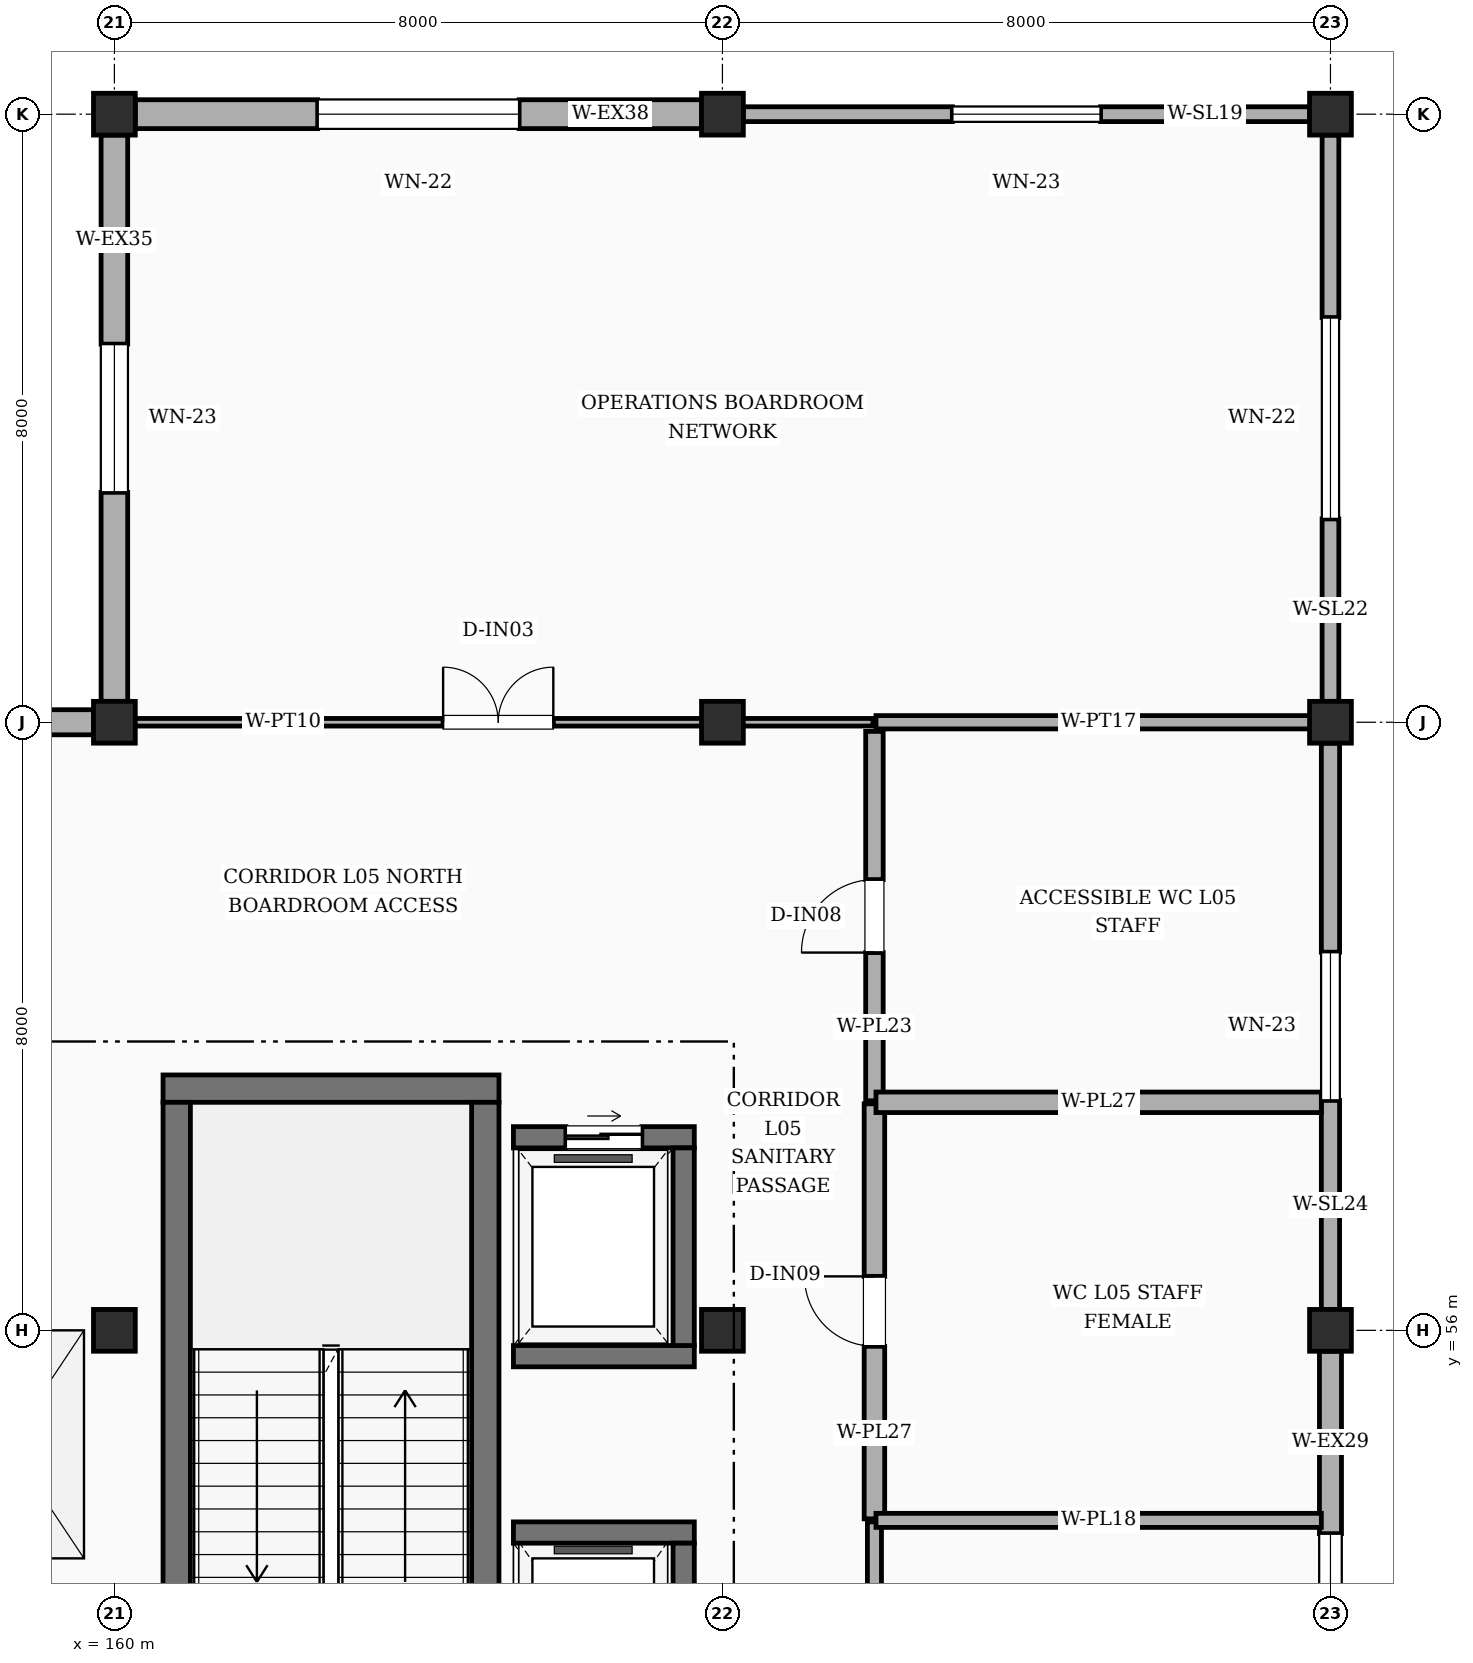
"""IFC4 building model, lengths in metres.
Left out: names, types, materials, properties, quantities, classifications, styles, units other than length and angle.
Written with IfcOpenShell. Run it as: python <this file> out.ifc"""

import sys

from ifc_helpers import new_model, si_unit, direction, frame, frame_2d, origin, origin_2d, place, context, subcontext, project, spatial, rectangle, extrude, element, fill, save


model = new_model("IFC4")
c1 = context("Model", 3, precision=1e-05, world=origin(), true_north=direction((0.0, 1.0)))
c2 = subcontext(c1, "Body", "Model", "MODEL_VIEW")
j1 = project(units=[si_unit("LENGTHUNIT", "METRE"), si_unit("PLANEANGLEUNIT", "RADIAN")], contexts=[c1])
p1 = place(None, origin())
s1 = spatial("IfcSite", under=j1, at=p1, CompositionType="ELEMENT")
p2 = place(p1, origin())
s2 = spatial("IfcBuilding", under=s1, at=p2, CompositionType="ELEMENT")
p3 = place(p2, frame((0.0, 0.0, 23.4)))
s3 = spatial("IfcBuildingStorey", under=s2, at=p3, CompositionType="ELEMENT", Elevation=23.4)
for number, where, z_axis, x_axis in (
    (1, (160.0, 56.0, 0.0), (0.0, 0.0, 1.0), (1.0, 0.0, 0.0)),
    (2, (160.0, 64.0, 0.0), (0.0, 0.0, 1.0), (1.0, 0.0, 0.0)),
    (3, (168.0, 56.0, 0.0), (0.0, 0.0, 1.0), (1.0, 0.0, 0.0)),
    (4, (168.0, 64.0, 0.0), (0.0, 0.0, 1.0), (1.0, 0.0, 0.0)),
    (5, (176.0, 56.0, 0.0), (0.0, 0.0, 1.0), (1.0, 0.0, 0.0)),
    (6, (176.0, 64.0, 0.0), (0.0, 0.0, 1.0), (1.0, 0.0, 0.0)),
    (7, (160.0, 72.0, 0.0), (0.0, 0.0, 1.0), (1.0, 0.0, 0.0)),
    (8, (168.0, 72.0, 0.0), (0.0, 0.0, 1.0), (1.0, 0.0, 0.0)),
    (9, (176.0, 72.0, 0.0), (0.0, 0.0, 1.0), (1.0, 0.0, 0.0)),
):
    element("IfcColumn", number, at=place(p3, frame(where, z_axis=z_axis, x_axis=x_axis)), inside=s3, PredefinedType="COLUMN", context=c2, shape_type="SweptSolid", body=[
        extrude(rectangle(XDim=0.55, YDim=0.55, at=origin_2d()), origin(), (0.0, 0.0, 1.0), 4.2),
    ])
p4 = place(p3, frame((176.0, 48.275, 0.0), z_axis=(0.0, 0.0, 1.0), x_axis=(0.0, 1.0, 0.0)))
e10 = element("IfcWall", 10, at=p4, inside=s3, PredefinedType="STANDARD", context=c2, shape_type="SweptSolid", body=[
    extrude(rectangle(XDim=7.45, YDim=0.29, at=frame_2d((3.725, 0.0))), origin(), (0.0, 0.0, 1.0), 3.58),
])
p5 = place(p4, frame((2.4, 0.0, 0.95)))
e11 = element("IfcOpeningElement", 11, at=p5, cuts=e10, PredefinedType="OPENING", context=c2, shape_type="SweptSolid", body=[
    extrude(rectangle(XDim=2.65, YDim=1.95, at=frame_2d((1.325, 0.975))), frame((0.0, 0.155, 0.0), z_axis=(0.0, -1.0, 0.0), x_axis=(1.0, 0.0, 0.0)), (0.0, 0.0, 1.0), 0.31),
])
p6 = place(p3, frame((176.0, 56.275, 0.0), z_axis=(0.0, 0.0, 1.0), x_axis=(0.0, 1.0, 0.0)))
e12 = element("IfcWall", 12, at=p6, inside=s3, PredefinedType="SOLIDWALL", context=c2, shape_type="SweptSolid", body=[
    extrude(rectangle(XDim=7.45, YDim=0.24, at=frame_2d((3.725, 0.0))), origin(), (0.0, 0.0, 1.0), 3.58),
])
p7 = place(p6, frame((2.75, 0.0, 0.95)))
e13 = element("IfcOpeningElement", 13, at=p7, cuts=e12, PredefinedType="OPENING", context=c2, shape_type="SweptSolid", body=[
    extrude(rectangle(XDim=1.95, YDim=1.95, at=frame_2d((0.975, 0.975))), frame((0.0, 0.13, 0.0), z_axis=(0.0, -1.0, 0.0), x_axis=(1.0, 0.0, 0.0)), (0.0, 0.0, 1.0), 0.26),
])
p8 = place(p3, frame((176.0, 64.275, 0.0), z_axis=(0.0, 0.0, 1.0), x_axis=(0.0, 1.0, 0.0)))
e14 = element("IfcWall", 14, at=p8, inside=s3, PredefinedType="SOLIDWALL", context=c2, shape_type="SweptSolid", body=[
    extrude(rectangle(XDim=7.45, YDim=0.22, at=frame_2d((3.725, 0.0))), origin(), (0.0, 0.0, 1.0), 3.442),
])
p9 = place(p8, frame((2.4, 0.0, 0.95)))
e15 = element("IfcOpeningElement", 15, at=p9, cuts=e14, PredefinedType="OPENING", context=c2, shape_type="SweptSolid", body=[
    extrude(rectangle(XDim=2.65, YDim=1.95, at=frame_2d((1.325, 0.975))), frame((0.0, 0.12, 0.0), z_axis=(0.0, -1.0, 0.0), x_axis=(1.0, 0.0, 0.0)), (0.0, 0.0, 1.0), 0.24),
])
p10 = place(p3, frame((175.725, 72.0, 0.0), z_axis=(0.0, 0.0, 1.0), x_axis=(-1.0, 0.0, 0.0)))
e16 = element("IfcWall", 16, at=p10, inside=s3, PredefinedType="SOLIDWALL", context=c2, shape_type="SweptSolid", body=[
    extrude(rectangle(XDim=7.45, YDim=0.195, at=frame_2d((3.725, 0.0))), origin(), (0.0, 0.0, 1.0), 3.58),
])
p11 = place(p10, frame((2.75, 0.0, 0.95)))
e17 = element("IfcOpeningElement", 17, at=p11, cuts=e16, PredefinedType="OPENING", context=c2, shape_type="SweptSolid", body=[
    extrude(rectangle(XDim=1.95, YDim=1.95, at=frame_2d((0.975, 0.975))), frame((0.0, 0.107, 0.0), z_axis=(0.0, -1.0, 0.0), x_axis=(1.0, 0.0, 0.0)), (0.0, 0.0, 1.0), 0.215),
])
p12 = place(p3, frame((167.725, 72.0, 0.0), z_axis=(0.0, 0.0, 1.0), x_axis=(-1.0, 0.0, 0.0)))
e18 = element("IfcWall", 18, at=p12, inside=s3, PredefinedType="STANDARD", context=c2, shape_type="SweptSolid", body=[
    extrude(rectangle(XDim=7.45, YDim=0.38, at=frame_2d((3.725, 0.0))), origin(), (0.0, 0.0, 1.0), 3.58),
])
p13 = place(p12, frame((2.4, 0.0, 0.95)))
e19 = element("IfcOpeningElement", 19, at=p13, cuts=e18, PredefinedType="OPENING", context=c2, shape_type="SweptSolid", body=[
    extrude(rectangle(XDim=2.65, YDim=1.95, at=frame_2d((1.325, 0.975))), frame((0.0, 0.2, 0.0), z_axis=(0.0, -1.0, 0.0), x_axis=(1.0, 0.0, 0.0)), (0.0, 0.0, 1.0), 0.4),
])
p14 = place(p3, frame((160.0, 71.725, 0.0), z_axis=(0.0, 0.0, 1.0), x_axis=(0.0, -1.0, 0.0)))
e20 = element("IfcWall", 20, at=p14, inside=s3, PredefinedType="STANDARD", context=c2, shape_type="SweptSolid", body=[
    extrude(rectangle(XDim=7.45, YDim=0.35, at=frame_2d((3.725, 0.0))), origin(), (0.0, 0.0, 1.0), 3.442),
])
p15 = place(p14, frame((2.75, 0.0, 0.95)))
e21 = element("IfcOpeningElement", 21, at=p15, cuts=e20, PredefinedType="OPENING", context=c2, shape_type="SweptSolid", body=[
    extrude(rectangle(XDim=1.95, YDim=1.95, at=frame_2d((0.975, 0.975))), frame((0.0, 0.185, 0.0), z_axis=(0.0, -1.0, 0.0), x_axis=(1.0, 0.0, 0.0)), (0.0, 0.0, 1.0), 0.37),
])
p16 = place(p3, frame((159.725, 64.0, 0.0), z_axis=(0.0, 0.0, 1.0), x_axis=(-1.0, 0.0, 0.0)))
e22 = element("IfcWall", 22, at=p16, inside=s3, PredefinedType="STANDARD", context=c2, shape_type="SweptSolid", body=[
    extrude(rectangle(XDim=7.45, YDim=0.33, at=frame_2d((3.725, 0.0))), origin(), (0.0, 0.0, 1.0), 3.97),
])
p17 = place(p16, frame((2.4, 0.0, 0.95)))
e23 = element("IfcOpeningElement", 23, at=p17, cuts=e22, PredefinedType="OPENING", context=c2, shape_type="SweptSolid", body=[
    extrude(rectangle(XDim=2.65, YDim=1.95, at=frame_2d((1.325, 0.975))), frame((0.0, 0.175, 0.0), z_axis=(0.0, -1.0, 0.0), x_axis=(1.0, 0.0, 0.0)), (0.0, 0.0, 1.0), 0.35),
])
p18 = place(p3, frame((160.64, 59.18, 0.0), z_axis=(0.0, 0.0, 1.0), x_axis=(1.0, 0.0, 0.0)))
e24 = element("IfcWall", 24, at=p18, inside=s3, PredefinedType="SHEAR", context=c2, shape_type="SweptSolid", body=[
    extrude(rectangle(XDim=4.42, YDim=0.36, at=frame_2d((2.21, 0.0))), origin(), (0.0, 0.0, 1.0), 4.2),
])
for number, where, z_axis, x_axis in (
    (25, (160.82, 50.4, 0.0), (0.0, 0.0, 1.0), (0.0, 1.0, 0.0)),
    (26, (164.88, 50.4, 0.0), (0.0, 0.0, 1.0), (0.0, 1.0, 0.0)),
):
    element("IfcWall", number, at=place(p3, frame(where, z_axis=z_axis, x_axis=x_axis)), inside=s3, PredefinedType="SHEAR", context=c2, shape_type="SweptSolid", body=[
        extrude(rectangle(XDim=8.6, YDim=0.36, at=frame_2d((4.3, 0.0))), origin(), (0.0, 0.0, 1.0), 4.2),
    ])
p19 = place(p3, frame((165.25, 53.34, 0.0), z_axis=(0.0, 0.0, 1.0), x_axis=(1.0, 0.0, 0.0)))
e27 = element("IfcWall", 27, at=p19, inside=s3, PredefinedType="SHEAR", context=c2, shape_type="SweptSolid", body=[
    extrude(rectangle(XDim=2.38, YDim=0.28, at=frame_2d((1.19, 0.0))), origin(), (0.0, 0.0, 1.0), 4.2),
])
p20 = place(p3, frame((167.49, 50.4, 0.0), z_axis=(0.0, 0.0, 1.0), x_axis=(0.0, 1.0, 0.0)))
e28 = element("IfcWall", 28, at=p20, inside=s3, PredefinedType="SHEAR", context=c2, shape_type="SweptSolid", body=[
    extrude(rectangle(XDim=2.8, YDim=0.28, at=frame_2d((1.4, 0.0))), origin(), (0.0, 0.0, 1.0), 4.2),
])
p21 = place(p3, frame((165.25, 55.66, 0.0), z_axis=(0.0, 0.0, 1.0), x_axis=(1.0, 0.0, 0.0)))
e29 = element("IfcWall", 29, at=p21, inside=s3, PredefinedType="SHEAR", context=c2, shape_type="SweptSolid", body=[
    extrude(rectangle(XDim=2.38, YDim=0.28, at=frame_2d((1.19, 0.0))), origin(), (0.0, 0.0, 1.0), 4.2),
])
p22 = place(p3, frame((165.25, 58.54, 0.0), z_axis=(0.0, 0.0, 1.0), x_axis=(1.0, 0.0, 0.0)))
e30 = element("IfcWall", 30, at=p22, inside=s3, PredefinedType="SHEAR", context=c2, shape_type="SweptSolid", body=[
    extrude(rectangle(XDim=2.38, YDim=0.28, at=frame_2d((1.19, 0.0))), origin(), (0.0, 0.0, 1.0), 4.2),
])
p23 = place(p22, frame((0.69, 0.0, 0.0)))
e31 = element("IfcOpeningElement", 31, at=p23, cuts=e30, PredefinedType="OPENING", context=c2, shape_type="SweptSolid", body=[
    extrude(rectangle(XDim=1.0, YDim=2.15, at=frame_2d((0.5, 1.075))), frame((0.0, 0.15, 0.0), z_axis=(0.0, -1.0, 0.0), x_axis=(1.0, 0.0, 0.0)), (0.0, 0.0, 1.0), 0.3),
])
p24 = place(p3, frame((167.49, 55.8, 0.0), z_axis=(0.0, 0.0, 1.0), x_axis=(0.0, 1.0, 0.0)))
e32 = element("IfcWall", 32, at=p24, inside=s3, PredefinedType="SHEAR", context=c2, shape_type="SweptSolid", body=[
    extrude(rectangle(XDim=2.6, YDim=0.28, at=frame_2d((1.3, 0.0))), origin(), (0.0, 0.0, 1.0), 4.2),
])
p25 = place(p3, frame((170.0, 48.02, 0.0), z_axis=(0.0, 0.0, 1.0), x_axis=(0.0, 1.0, 0.0)))
e33 = element("IfcWall", 33, at=p25, inside=s3, PredefinedType="PLUMBINGWALL", context=c2, shape_type="SweptSolid", body=[
    extrude(rectangle(XDim=5.46, YDim=0.185, at=frame_2d((2.73, 0.0))), origin(), (0.0, 0.0, 1.0), 3.429),
])
p26 = place(p25, frame((2.27, 0.0, 0.0)))
e34 = element("IfcOpeningElement", 34, at=p26, cuts=e33, PredefinedType="OPENING", context=c2, shape_type="SweptSolid", body=[
    extrude(rectangle(XDim=0.92, YDim=2.1, at=frame_2d((0.46, 1.05))), frame((0.0, 0.103, 0.0), z_axis=(0.0, -1.0, 0.0), x_axis=(1.0, 0.0, 0.0)), (0.0, 0.0, 1.0), 0.205),
])
p27 = place(p3, frame((170.0, 53.52, 0.0), z_axis=(0.0, 0.0, 1.0), x_axis=(0.0, 1.0, 0.0)))
e35 = element("IfcWall", 35, at=p27, inside=s3, PredefinedType="PLUMBINGWALL", context=c2, shape_type="SweptSolid", body=[
    extrude(rectangle(XDim=5.46, YDim=0.27, at=frame_2d((2.73, 0.0))), origin(), (0.0, 0.0, 1.0), 3.97),
])
p28 = place(p27, frame((2.27, 0.0, 0.0)))
e36 = element("IfcOpeningElement", 36, at=p28, cuts=e35, PredefinedType="OPENING", context=c2, shape_type="SweptSolid", body=[
    extrude(rectangle(XDim=0.92, YDim=2.1, at=frame_2d((0.46, 1.05))), frame((0.0, 0.145, 0.0), z_axis=(0.0, -1.0, 0.0), x_axis=(1.0, 0.0, 0.0)), (0.0, 0.0, 1.0), 0.29),
])
p29 = place(p3, frame((170.0, 59.02, 0.0), z_axis=(0.0, 0.0, 1.0), x_axis=(0.0, 1.0, 0.0)))
e37 = element("IfcWall", 37, at=p29, inside=s3, PredefinedType="PLUMBINGWALL", context=c2, shape_type="SweptSolid", body=[
    extrude(rectangle(XDim=4.86, YDim=0.23, at=frame_2d((2.43, 0.0))), origin(), (0.0, 0.0, 1.0), 3.429),
])
p30 = place(p29, frame((1.95, 0.0, 0.0)))
e38 = element("IfcOpeningElement", 38, at=p30, cuts=e37, PredefinedType="OPENING", context=c2, shape_type="SweptSolid", body=[
    extrude(rectangle(XDim=0.96, YDim=2.1, at=frame_2d((0.48, 1.05))), frame((0.0, 0.125, 0.0), z_axis=(0.0, -1.0, 0.0), x_axis=(1.0, 0.0, 0.0)), (0.0, 0.0, 1.0), 0.25),
])
p31 = place(p3, frame((170.02, 53.5, 0.0), z_axis=(0.0, 0.0, 1.0), x_axis=(1.0, 0.0, 0.0)))
e39 = element("IfcWall", 39, at=p31, inside=s3, PredefinedType="PLUMBINGWALL", context=c2, shape_type="SweptSolid", body=[
    extrude(rectangle(XDim=5.86, YDim=0.185, at=frame_2d((2.93, 0.0))), origin(), (0.0, 0.0, 1.0), 3.58),
])
p32 = place(p3, frame((170.02, 59.0, 0.0), z_axis=(0.0, 0.0, 1.0), x_axis=(1.0, 0.0, 0.0)))
e40 = element("IfcWall", 40, at=p32, inside=s3, PredefinedType="PLUMBINGWALL", context=c2, shape_type="SweptSolid", body=[
    extrude(rectangle(XDim=5.86, YDim=0.27, at=frame_2d((2.93, 0.0))), origin(), (0.0, 0.0, 1.0), 3.58),
])
p33 = place(p3, frame((160.12, 64.0, 0.0), z_axis=(0.0, 0.0, 1.0), x_axis=(1.0, 0.0, 0.0)))
e41 = element("IfcWall", 41, at=p33, inside=s3, PredefinedType="PARTITIONING", context=c2, shape_type="SweptSolid", body=[
    extrude(rectangle(XDim=9.86, YDim=0.1, at=frame_2d((4.93, 0.0))), origin(), (0.0, 0.0, 1.0), 3.429),
])
p34 = place(p33, frame((4.205, 0.0, 0.0)))
e42 = element("IfcOpeningElement", 42, at=p34, cuts=e41, PredefinedType="OPENING", context=c2, shape_type="SweptSolid", body=[
    extrude(rectangle(XDim=1.45, YDim=2.2, at=frame_2d((0.725, 1.1))), frame((0.0, 0.06, 0.0), z_axis=(0.0, -1.0, 0.0), x_axis=(1.0, 0.0, 0.0)), (0.0, 0.0, 1.0), 0.12),
])
p35 = place(p3, frame((170.02, 64.0, 0.0), z_axis=(0.0, 0.0, 1.0), x_axis=(1.0, 0.0, 0.0)))
e43 = element("IfcWall", 43, at=p35, inside=s3, PredefinedType="PARTITIONING", context=c2, shape_type="SweptSolid", body=[
    extrude(rectangle(XDim=5.86, YDim=0.175, at=frame_2d((2.93, 0.0))), origin(), (0.0, 0.0, 1.0), 3.429),
])
p36 = place(p5, origin())
e44 = element("IfcWindow", 44, at=p36, inside=s3, PartitioningType="SINGLE_PANEL", PredefinedType="WINDOW", context=c2, shape_type="SweptSolid", body=[
    extrude(rectangle(XDim=2.65, YDim=1.95, at=frame_2d((1.325, 0.975))), frame((0.0, 0.03, 0.0), z_axis=(0.0, -1.0, 0.0), x_axis=(1.0, 0.0, 0.0)), (0.0, 0.0, 1.0), 0.06),
])
fill(e11, e44)
p37 = place(p7, origin())
e45 = element("IfcWindow", 45, at=p37, inside=s3, PartitioningType="SINGLE_PANEL", PredefinedType="WINDOW", context=c2, shape_type="SweptSolid", body=[
    extrude(rectangle(XDim=1.95, YDim=1.95, at=frame_2d((0.975, 0.975))), frame((0.0, 0.03, 0.0), z_axis=(0.0, -1.0, 0.0), x_axis=(1.0, 0.0, 0.0)), (0.0, 0.0, 1.0), 0.06),
])
fill(e13, e45)
p38 = place(p9, origin())
e46 = element("IfcWindow", 46, at=p38, inside=s3, PartitioningType="SINGLE_PANEL", PredefinedType="WINDOW", context=c2, shape_type="SweptSolid", body=[
    extrude(rectangle(XDim=2.65, YDim=1.95, at=frame_2d((1.325, 0.975))), frame((0.0, 0.03, 0.0), z_axis=(0.0, -1.0, 0.0), x_axis=(1.0, 0.0, 0.0)), (0.0, 0.0, 1.0), 0.06),
])
fill(e15, e46)
p39 = place(p11, origin())
e47 = element("IfcWindow", 47, at=p39, inside=s3, PartitioningType="SINGLE_PANEL", PredefinedType="WINDOW", context=c2, shape_type="SweptSolid", body=[
    extrude(rectangle(XDim=1.95, YDim=1.95, at=frame_2d((0.975, 0.975))), frame((0.0, 0.03, 0.0), z_axis=(0.0, -1.0, 0.0), x_axis=(1.0, 0.0, 0.0)), (0.0, 0.0, 1.0), 0.06),
])
fill(e17, e47)
p40 = place(p13, origin())
e48 = element("IfcWindow", 48, at=p40, inside=s3, PartitioningType="SINGLE_PANEL", PredefinedType="WINDOW", context=c2, shape_type="SweptSolid", body=[
    extrude(rectangle(XDim=2.65, YDim=1.95, at=frame_2d((1.325, 0.975))), frame((0.0, 0.03, 0.0), z_axis=(0.0, -1.0, 0.0), x_axis=(1.0, 0.0, 0.0)), (0.0, 0.0, 1.0), 0.06),
])
fill(e19, e48)
p41 = place(p15, origin())
e49 = element("IfcWindow", 49, at=p41, inside=s3, PartitioningType="SINGLE_PANEL", PredefinedType="WINDOW", context=c2, shape_type="SweptSolid", body=[
    extrude(rectangle(XDim=1.95, YDim=1.95, at=frame_2d((0.975, 0.975))), frame((0.0, 0.03, 0.0), z_axis=(0.0, -1.0, 0.0), x_axis=(1.0, 0.0, 0.0)), (0.0, 0.0, 1.0), 0.06),
])
fill(e21, e49)
p42 = place(p2, frame((0.0, 0.0, 27.6)))
p43 = place(p42, frame((0.0, 0.0, 1.925)))
p44 = place(p43, frame((158.6, 54.5, 0.0)))
p45 = place(p44, frame((0.0, 0.0, 0.175)))
e50 = element("IfcWindow", 50, at=p45, inside=s3, PartitioningType="SINGLE_PANEL", PredefinedType="SKYLIGHT", context=c2, shape_type="SweptSolid", body=[
    extrude(rectangle(XDim=2.0, YDim=3.0, at=origin_2d()), origin(), (0.0, 0.0, 1.0), 0.05),
])
p46 = place(p23, origin())
e51 = element("IfcDoor", 51, at=p46, inside=s3, OperationType="SLIDING_TO_LEFT", PredefinedType="DOOR", context=c2, shape_type="SweptSolid", body=[
    extrude(rectangle(XDim=1.0, YDim=2.15, at=frame_2d((0.5, 1.075))), frame((0.0, 0.025, 0.0), z_axis=(0.0, -1.0, 0.0), x_axis=(1.0, 0.0, 0.0)), (0.0, 0.0, 1.0), 0.05),
])
fill(e31, e51)
p47 = place(p28, origin())
e52 = element("IfcDoor", 52, at=p47, inside=s3, OperationType="SINGLE_SWING_RIGHT", PredefinedType="DOOR", context=c2, shape_type="SweptSolid", body=[
    extrude(rectangle(XDim=0.92, YDim=2.1, at=frame_2d((0.46, 1.05))), frame((0.0, 0.025, 0.0), z_axis=(0.0, -1.0, 0.0), x_axis=(1.0, 0.0, 0.0)), (0.0, 0.0, 1.0), 0.05),
])
fill(e36, e52)
p48 = place(p30, origin())
e53 = element("IfcDoor", 53, at=p48, inside=s3, OperationType="SINGLE_SWING_LEFT", PredefinedType="DOOR", context=c2, shape_type="SweptSolid", body=[
    extrude(rectangle(XDim=0.96, YDim=2.1, at=frame_2d((0.48, 1.05))), frame((0.0, 0.025, 0.0), z_axis=(0.0, -1.0, 0.0), x_axis=(1.0, 0.0, 0.0)), (0.0, 0.0, 1.0), 0.05),
])
fill(e38, e53)
p49 = place(p34, origin())
e54 = element("IfcDoor", 54, at=p49, inside=s3, OperationType="DOUBLE_DOOR_SINGLE_SWING", PredefinedType="DOOR", context=c2, shape_type="SweptSolid", body=[
    extrude(rectangle(XDim=1.45, YDim=2.2, at=frame_2d((0.725, 1.1))), frame((0.0, 0.025, 0.0), z_axis=(0.0, -1.0, 0.0), x_axis=(1.0, 0.0, 0.0)), (0.0, 0.0, 1.0), 0.05),
])
fill(e42, e54)
save(model, sys.argv[1])
